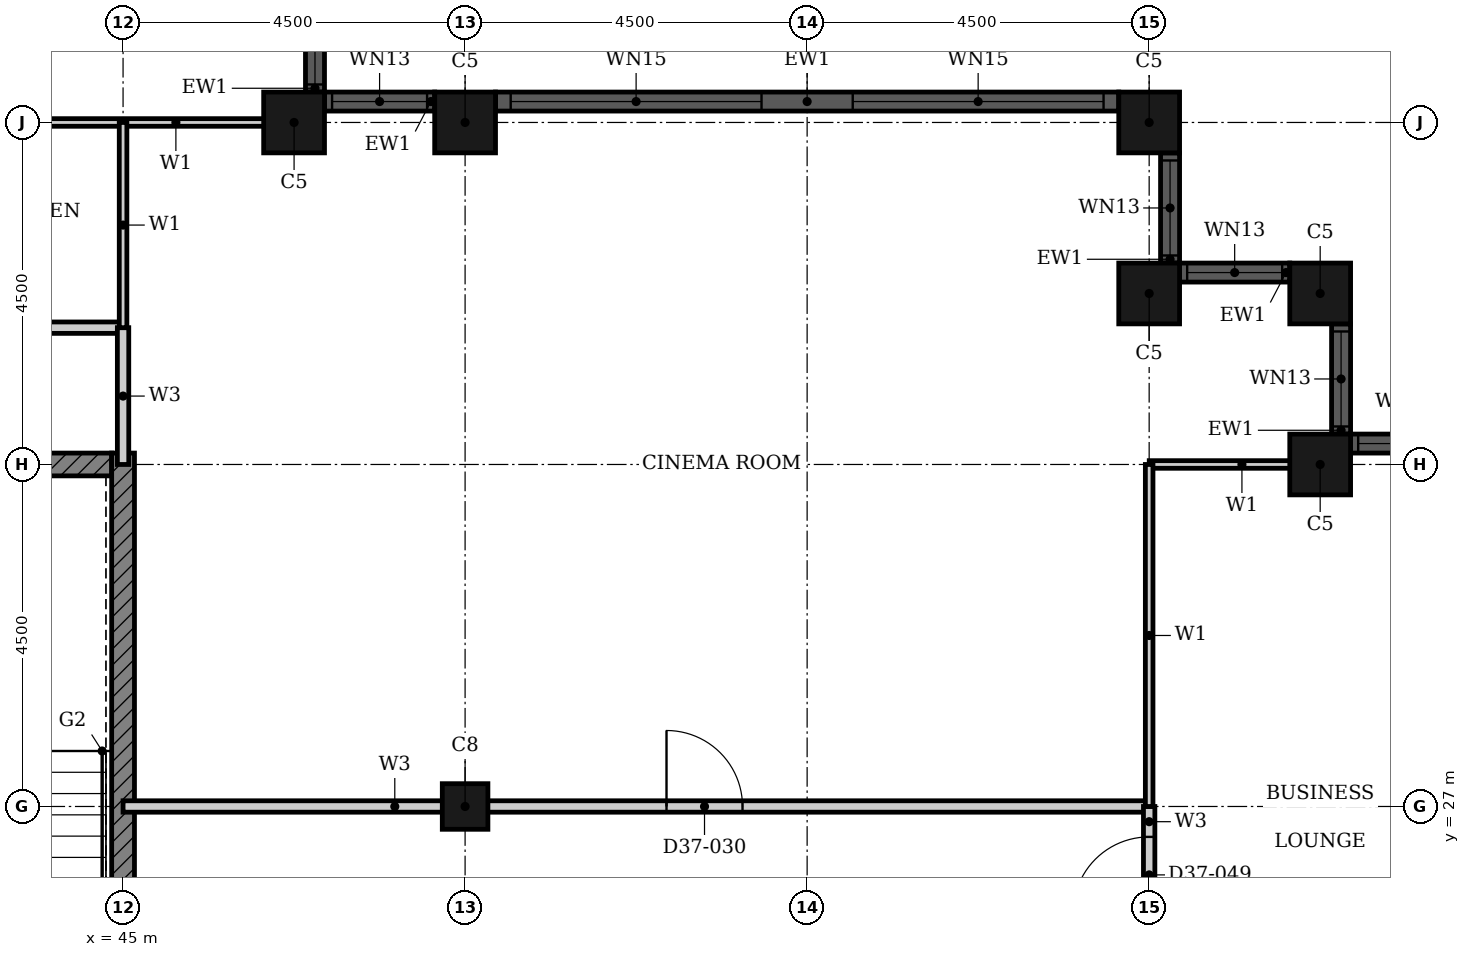
"""IFC4 building model, lengths in metres.
Left out: names, types, materials, properties, quantities, classifications, styles, units other than length and angle.
Written with IfcOpenShell. Run it as: python <this file> out.ifc"""

import sys

from ifc_helpers import new_model, si_unit, direction, frame, frame_2d, origin, origin_2d, place, context, subcontext, project, spatial, rectangle, hollow_rectangle, extrude, element, fill, save


model = new_model("IFC4")
c1 = context("Model", 3, precision=1e-05, world=origin(), true_north=direction((0.0, 1.0)))
c2 = subcontext(c1, "Body", "Model", "MODEL_VIEW")
j1 = project(units=[si_unit("LENGTHUNIT", "METRE"), si_unit("PLANEANGLEUNIT", "RADIAN")], contexts=[c1])
p1 = place(None, origin())
s1 = spatial("IfcSite", under=j1, at=p1, CompositionType="ELEMENT")
p2 = place(p1, origin())
s2 = spatial("IfcBuilding", under=s1, at=p2, CompositionType="ELEMENT")
p3 = place(p2, frame((0.0, 0.0, 150.6)))
s3 = spatial("IfcBuildingStorey", under=s2, at=p3, CompositionType="ELEMENT", Elevation=150.6)
for number, where, z_axis, x_axis in (
    (1, (60.75, 31.5, 0.0), (0.0, 0.0, 1.0), (1.0, 0.0, 0.0)),
    (2, (60.75, 33.75, 0.0), (0.0, 0.0, 1.0), (1.0, 0.0, 0.0)),
    (3, (58.5, 33.75, 0.0), (0.0, 0.0, 1.0), (1.0, 0.0, 0.0)),
    (4, (58.5, 36.0, 0.0), (0.0, 0.0, 1.0), (1.0, 0.0, 0.0)),
    (5, (49.5, 36.0, 0.0), (0.0, 0.0, 1.0), (1.0, 0.0, 0.0)),
    (6, (47.25, 36.0, 0.0), (0.0, 0.0, 1.0), (1.0, 0.0, 0.0)),
):
    element("IfcColumn", number, at=place(p3, frame(where, z_axis=z_axis, x_axis=x_axis)), inside=s3, PredefinedType="COLUMN", context=c2, shape_type="SweptSolid", body=[
        extrude(hollow_rectangle(XDim=0.8, YDim=0.8, WallThickness=0.025, at=origin_2d()), origin(), (0.0, 0.0, 1.0), 3.7),
    ])
p4 = place(p3, frame((49.5, 27.0, 0.0), z_axis=(0.0, 0.0, 1.0), x_axis=(1.0, 0.0, 0.0)))
e7 = element("IfcColumn", 7, at=p4, inside=s3, PredefinedType="COLUMN", context=c2, shape_type="SweptSolid", body=[
    extrude(hollow_rectangle(XDim=0.6, YDim=0.6, WallThickness=0.02, at=origin_2d()), origin(), (0.0, 0.0, 1.0), 3.7),
])
p5 = place(p3, frame((62.6, 31.775, 0.0), z_axis=(0.0, 0.0, 1.0), x_axis=(-1.0, 0.0, 0.0)))
e8 = element("IfcWall", 8, at=p5, inside=s3, PredefinedType="SOLIDWALL", context=c2, shape_type="SweptSolid", body=[
    extrude(rectangle(XDim=1.45, YDim=0.25, at=frame_2d((0.725, 0.0))), origin(), (0.0, 0.0, 1.0), 3.7),
])
p6 = place(p5, frame((0.1, 0.0, 0.9)))
e9 = element("IfcOpeningElement", 9, at=p6, cuts=e8, PredefinedType="OPENING", context=c2, shape_type="SweptSolid", body=[
    extrude(rectangle(XDim=1.25, YDim=1.85, at=frame_2d((0.625, 0.925))), frame((0.0, 0.135, 0.0), z_axis=(0.0, -1.0, 0.0), x_axis=(1.0, 0.0, 0.0)), (0.0, 0.0, 1.0), 0.27),
])
p7 = place(p3, frame((61.025, 31.9, 0.0), z_axis=(0.0, 0.0, 1.0), x_axis=(0.0, 1.0, 0.0)))
e10 = element("IfcWall", 10, at=p7, inside=s3, PredefinedType="SOLIDWALL", context=c2, shape_type="SweptSolid", body=[
    extrude(rectangle(XDim=1.45, YDim=0.25, at=frame_2d((0.725, 0.0))), origin(), (0.0, 0.0, 1.0), 3.7),
])
p8 = place(p7, frame((0.1, 0.0, 0.9)))
e11 = element("IfcOpeningElement", 11, at=p8, cuts=e10, PredefinedType="OPENING", context=c2, shape_type="SweptSolid", body=[
    extrude(rectangle(XDim=1.25, YDim=1.85, at=frame_2d((0.625, 0.925))), frame((0.0, 0.135, 0.0), z_axis=(0.0, -1.0, 0.0), x_axis=(1.0, 0.0, 0.0)), (0.0, 0.0, 1.0), 0.27),
])
p9 = place(p3, frame((60.35, 34.025, 0.0), z_axis=(0.0, 0.0, 1.0), x_axis=(-1.0, 0.0, 0.0)))
e12 = element("IfcWall", 12, at=p9, inside=s3, PredefinedType="SOLIDWALL", context=c2, shape_type="SweptSolid", body=[
    extrude(rectangle(XDim=1.45, YDim=0.25, at=frame_2d((0.725, 0.0))), origin(), (0.0, 0.0, 1.0), 3.7),
])
p10 = place(p9, frame((0.1, 0.0, 0.9)))
e13 = element("IfcOpeningElement", 13, at=p10, cuts=e12, PredefinedType="OPENING", context=c2, shape_type="SweptSolid", body=[
    extrude(rectangle(XDim=1.25, YDim=1.85, at=frame_2d((0.625, 0.925))), frame((0.0, 0.135, 0.0), z_axis=(0.0, -1.0, 0.0), x_axis=(1.0, 0.0, 0.0)), (0.0, 0.0, 1.0), 0.27),
])
p11 = place(p3, frame((58.775, 34.15, 0.0), z_axis=(0.0, 0.0, 1.0), x_axis=(0.0, 1.0, 0.0)))
e14 = element("IfcWall", 14, at=p11, inside=s3, PredefinedType="SOLIDWALL", context=c2, shape_type="SweptSolid", body=[
    extrude(rectangle(XDim=1.45, YDim=0.25, at=frame_2d((0.725, 0.0))), origin(), (0.0, 0.0, 1.0), 3.7),
])
p12 = place(p11, frame((0.1, 0.0, 0.9)))
e15 = element("IfcOpeningElement", 15, at=p12, cuts=e14, PredefinedType="OPENING", context=c2, shape_type="SweptSolid", body=[
    extrude(rectangle(XDim=1.25, YDim=1.85, at=frame_2d((0.625, 0.925))), frame((0.0, 0.135, 0.0), z_axis=(0.0, -1.0, 0.0), x_axis=(1.0, 0.0, 0.0)), (0.0, 0.0, 1.0), 0.27),
])
p13 = place(p3, frame((58.1, 36.275, 0.0), z_axis=(0.0, 0.0, 1.0), x_axis=(-1.0, 0.0, 0.0)))
e16 = element("IfcWall", 16, at=p13, inside=s3, PredefinedType="SOLIDWALL", context=c2, shape_type="SweptSolid", body=[
    extrude(rectangle(XDim=8.2, YDim=0.25, at=frame_2d((4.1, 0.0))), origin(), (0.0, 0.0, 1.0), 3.7),
])
p14 = place(p13, frame((0.2, 0.0, 0.45)))
e17 = element("IfcOpeningElement", 17, at=p14, cuts=e16, PredefinedType="OPENING", context=c2, shape_type="SweptSolid", body=[
    extrude(rectangle(XDim=3.3, YDim=2.3, at=frame_2d((1.65, 1.15))), frame((0.0, 0.135, 0.0), z_axis=(0.0, -1.0, 0.0), x_axis=(1.0, 0.0, 0.0)), (0.0, 0.0, 1.0), 0.27),
])
p15 = place(p13, frame((4.7, 0.0, 0.45)))
e18 = element("IfcOpeningElement", 18, at=p15, cuts=e16, PredefinedType="OPENING", context=c2, shape_type="SweptSolid", body=[
    extrude(rectangle(XDim=3.3, YDim=2.3, at=frame_2d((1.65, 1.15))), frame((0.0, 0.135, 0.0), z_axis=(0.0, -1.0, 0.0), x_axis=(1.0, 0.0, 0.0)), (0.0, 0.0, 1.0), 0.27),
])
p16 = place(p3, frame((49.1, 36.275, 0.0), z_axis=(0.0, 0.0, 1.0), x_axis=(-1.0, 0.0, 0.0)))
e19 = element("IfcWall", 19, at=p16, inside=s3, PredefinedType="SOLIDWALL", context=c2, shape_type="SweptSolid", body=[
    extrude(rectangle(XDim=1.45, YDim=0.25, at=frame_2d((0.725, 0.0))), origin(), (0.0, 0.0, 1.0), 3.7),
])
p17 = place(p16, frame((0.1, 0.0, 0.9)))
e20 = element("IfcOpeningElement", 20, at=p17, cuts=e19, PredefinedType="OPENING", context=c2, shape_type="SweptSolid", body=[
    extrude(rectangle(XDim=1.25, YDim=1.85, at=frame_2d((0.625, 0.925))), frame((0.0, 0.135, 0.0), z_axis=(0.0, -1.0, 0.0), x_axis=(1.0, 0.0, 0.0)), (0.0, 0.0, 1.0), 0.27),
])
p18 = place(p3, frame((47.525, 36.4, 0.0), z_axis=(0.0, 0.0, 1.0), x_axis=(0.0, 1.0, 0.0)))
e21 = element("IfcWall", 21, at=p18, inside=s3, PredefinedType="SOLIDWALL", context=c2, shape_type="SweptSolid", body=[
    extrude(rectangle(XDim=1.45, YDim=0.25, at=frame_2d((0.725, 0.0))), origin(), (0.0, 0.0, 1.0), 3.7),
])
p19 = place(p18, frame((0.1, 0.0, 0.9)))
e22 = element("IfcOpeningElement", 22, at=p19, cuts=e21, PredefinedType="OPENING", context=c2, shape_type="SweptSolid", body=[
    extrude(rectangle(XDim=1.25, YDim=1.85, at=frame_2d((0.625, 0.925))), frame((0.0, 0.135, 0.0), z_axis=(0.0, -1.0, 0.0), x_axis=(1.0, 0.0, 0.0)), (0.0, 0.0, 1.0), 0.27),
])
p20 = place(p3, frame((40.625, 31.5, 0.0), z_axis=(0.0, 0.0, 1.0), x_axis=(1.0, 0.0, 0.0)))
e23 = element("IfcWall", 23, at=p20, inside=s3, PredefinedType="SHEAR", context=c2, shape_type="SweptSolid", body=[
    extrude(rectangle(XDim=4.225, YDim=0.3, at=frame_2d((2.113, 0.0))), origin(), (0.0, 0.0, 1.0), 3.4),
])
p21 = place(p3, frame((45.0, 22.35, 0.0), z_axis=(0.0, 0.0, 1.0), x_axis=(0.0, 1.0, 0.0)))
e24 = element("IfcWall", 24, at=p21, inside=s3, PredefinedType="SHEAR", context=c2, shape_type="SweptSolid", body=[
    extrude(rectangle(XDim=9.3, YDim=0.3, at=frame_2d((4.65, 0.0))), origin(), (0.0, 0.0, 1.0), 3.4),
])
p22 = place(p3, frame((45.0, 27.0, 0.0), z_axis=(0.0, 0.0, 1.0), x_axis=(1.0, 0.0, 0.0)))
e25 = element("IfcWall", 25, at=p22, inside=s3, PredefinedType="PARTITIONING", context=c2, shape_type="SweptSolid", body=[
    extrude(rectangle(XDim=13.5, YDim=0.15, at=frame_2d((6.75, 0.0))), origin(), (0.0, 0.0, 1.0), 2.68),
])
p23 = place(p22, frame((7.15, 0.0, 0.0)))
e26 = element("IfcOpeningElement", 26, at=p23, cuts=e25, PredefinedType="OPENING", context=c2, shape_type="SweptSolid", body=[
    extrude(rectangle(XDim=1.0, YDim=2.1, at=frame_2d((0.5, 1.05))), frame((0.0, 0.085, 0.0), z_axis=(0.0, -1.0, 0.0), x_axis=(1.0, 0.0, 0.0)), (0.0, 0.0, 1.0), 0.17),
])
p24 = place(p3, frame((38.4, 33.3, 0.0), z_axis=(0.0, 0.0, 1.0), x_axis=(1.0, 0.0, 0.0)))
e27 = element("IfcWall", 27, at=p24, inside=s3, PredefinedType="PARTITIONING", context=c2, shape_type="SweptSolid", body=[
    extrude(rectangle(XDim=6.6, YDim=0.15, at=frame_2d((3.3, 0.0))), origin(), (0.0, 0.0, 1.0), 3.4),
])
p25 = place(p24, frame((1.3, 0.0, 0.0)))
e28 = element("IfcOpeningElement", 28, at=p25, cuts=e27, PredefinedType="OPENING", context=c2, shape_type="SweptSolid", body=[
    extrude(rectangle(XDim=1.0, YDim=2.2, at=frame_2d((0.5, 1.1))), frame((0.0, 0.085, 0.0), z_axis=(0.0, -1.0, 0.0), x_axis=(1.0, 0.0, 0.0)), (0.0, 0.0, 1.0), 0.17),
])
p26 = place(p3, frame((45.0, 31.5, 0.0), z_axis=(0.0, 0.0, 1.0), x_axis=(0.0, 1.0, 0.0)))
e29 = element("IfcWall", 29, at=p26, inside=s3, PredefinedType="PARTITIONING", context=c2, shape_type="SweptSolid", body=[
    extrude(rectangle(XDim=1.8, YDim=0.15, at=frame_2d((0.9, 0.0))), origin(), (0.0, 0.0, 1.0), 3.4),
])
p27 = place(p3, frame((58.5, 25.2, 0.0), z_axis=(0.0, 0.0, 1.0), x_axis=(0.0, 1.0, 0.0)))
e30 = element("IfcWall", 30, at=p27, inside=s3, PredefinedType="PARTITIONING", context=c2, shape_type="SweptSolid", body=[
    extrude(rectangle(XDim=1.8, YDim=0.15, at=frame_2d((0.9, 0.0))), origin(), (0.0, 0.0, 1.0), 3.4),
])
p28 = place(p27, frame((0.4, 0.0, 0.0)))
e31 = element("IfcOpeningElement", 31, at=p28, cuts=e30, PredefinedType="OPENING", context=c2, shape_type="SweptSolid", body=[
    extrude(rectangle(XDim=1.0, YDim=2.1, at=frame_2d((0.5, 1.05))), frame((0.0, 0.085, 0.0), z_axis=(0.0, -1.0, 0.0), x_axis=(1.0, 0.0, 0.0)), (0.0, 0.0, 1.0), 0.17),
])
p29 = place(p3, frame((58.501, 31.5, 0.0), z_axis=(0.0, 0.0, 1.0), x_axis=(1.0, 0.0, 0.0)))
e32 = element("IfcWall", 32, at=p29, inside=s3, PredefinedType="PARTITIONING", context=c2, shape_type="SweptSolid", body=[
    extrude(rectangle(XDim=2.439, YDim=0.1, at=frame_2d((1.219, 0.0))), origin(), (0.0, 0.0, 1.0), 2.68),
])
p30 = place(p3, frame((42.0, 36.0, 0.0), z_axis=(0.0, 0.0, 1.0), x_axis=(1.0, 0.0, 0.0)))
e33 = element("IfcWall", 33, at=p30, inside=s3, PredefinedType="PARTITIONING", context=c2, shape_type="SweptSolid", body=[
    extrude(rectangle(XDim=5.44, YDim=0.1, at=frame_2d((2.72, 0.0))), origin(), (0.0, 0.0, 1.0), 3.4),
])
p31 = place(p30, frame((1.05, 0.0, 0.0)))
e34 = element("IfcOpeningElement", 34, at=p31, cuts=e33, PredefinedType="OPENING", context=c2, shape_type="SweptSolid", body=[
    extrude(rectangle(XDim=0.9, YDim=2.1, at=frame_2d((0.45, 1.05))), frame((0.0, 0.06, 0.0), z_axis=(0.0, -1.0, 0.0), x_axis=(1.0, 0.0, 0.0)), (0.0, 0.0, 1.0), 0.12),
])
p32 = place(p3, frame((45.0, 33.3, 0.0), z_axis=(0.0, 0.0, 1.0), x_axis=(0.0, 1.0, 0.0)))
e35 = element("IfcWall", 35, at=p32, inside=s3, PredefinedType="PARTITIONING", context=c2, shape_type="SweptSolid", body=[
    extrude(rectangle(XDim=2.7, YDim=0.1, at=frame_2d((1.35, 0.0))), origin(), (0.0, 0.0, 1.0), 3.4),
])
p33 = place(p3, frame((58.5, 27.0, 0.0), z_axis=(0.0, 0.0, 1.0), x_axis=(0.0, 1.0, 0.0)))
e36 = element("IfcWall", 36, at=p33, inside=s3, PredefinedType="PARTITIONING", context=c2, shape_type="SweptSolid", body=[
    extrude(rectangle(XDim=4.5, YDim=0.1, at=frame_2d((2.25, 0.0))), origin(), (0.0, 0.0, 1.0), 3.4),
])
p34 = place(p6, origin())
e37 = element("IfcWindow", 37, at=p34, inside=s3, PartitioningType="SINGLE_PANEL", PredefinedType="WINDOW", context=c2, shape_type="SweptSolid", body=[
    extrude(rectangle(XDim=1.25, YDim=1.85, at=frame_2d((0.625, 0.925))), frame((0.0, 0.03, 0.0), z_axis=(0.0, -1.0, 0.0), x_axis=(1.0, 0.0, 0.0)), (0.0, 0.0, 1.0), 0.06),
])
fill(e9, e37)
p35 = place(p8, origin())
e38 = element("IfcWindow", 38, at=p35, inside=s3, PartitioningType="SINGLE_PANEL", PredefinedType="WINDOW", context=c2, shape_type="SweptSolid", body=[
    extrude(rectangle(XDim=1.25, YDim=1.85, at=frame_2d((0.625, 0.925))), frame((0.0, 0.03, 0.0), z_axis=(0.0, -1.0, 0.0), x_axis=(1.0, 0.0, 0.0)), (0.0, 0.0, 1.0), 0.06),
])
fill(e11, e38)
p36 = place(p10, origin())
e39 = element("IfcWindow", 39, at=p36, inside=s3, PartitioningType="SINGLE_PANEL", PredefinedType="WINDOW", context=c2, shape_type="SweptSolid", body=[
    extrude(rectangle(XDim=1.25, YDim=1.85, at=frame_2d((0.625, 0.925))), frame((0.0, 0.03, 0.0), z_axis=(0.0, -1.0, 0.0), x_axis=(1.0, 0.0, 0.0)), (0.0, 0.0, 1.0), 0.06),
])
fill(e13, e39)
p37 = place(p12, origin())
e40 = element("IfcWindow", 40, at=p37, inside=s3, PartitioningType="SINGLE_PANEL", PredefinedType="WINDOW", context=c2, shape_type="SweptSolid", body=[
    extrude(rectangle(XDim=1.25, YDim=1.85, at=frame_2d((0.625, 0.925))), frame((0.0, 0.03, 0.0), z_axis=(0.0, -1.0, 0.0), x_axis=(1.0, 0.0, 0.0)), (0.0, 0.0, 1.0), 0.06),
])
fill(e15, e40)
p38 = place(p14, origin())
e41 = element("IfcWindow", 41, at=p38, inside=s3, PartitioningType="SINGLE_PANEL", PredefinedType="WINDOW", context=c2, shape_type="SweptSolid", body=[
    extrude(rectangle(XDim=3.3, YDim=2.3, at=frame_2d((1.65, 1.15))), frame((0.0, 0.03, 0.0), z_axis=(0.0, -1.0, 0.0), x_axis=(1.0, 0.0, 0.0)), (0.0, 0.0, 1.0), 0.06),
])
fill(e17, e41)
p39 = place(p15, origin())
e42 = element("IfcWindow", 42, at=p39, inside=s3, PartitioningType="SINGLE_PANEL", PredefinedType="WINDOW", context=c2, shape_type="SweptSolid", body=[
    extrude(rectangle(XDim=3.3, YDim=2.3, at=frame_2d((1.65, 1.15))), frame((0.0, 0.03, 0.0), z_axis=(0.0, -1.0, 0.0), x_axis=(1.0, 0.0, 0.0)), (0.0, 0.0, 1.0), 0.06),
])
fill(e18, e42)
p40 = place(p17, origin())
e43 = element("IfcWindow", 43, at=p40, inside=s3, PartitioningType="SINGLE_PANEL", PredefinedType="WINDOW", context=c2, shape_type="SweptSolid", body=[
    extrude(rectangle(XDim=1.25, YDim=1.85, at=frame_2d((0.625, 0.925))), frame((0.0, 0.03, 0.0), z_axis=(0.0, -1.0, 0.0), x_axis=(1.0, 0.0, 0.0)), (0.0, 0.0, 1.0), 0.06),
])
fill(e20, e43)
p41 = place(p19, origin())
e44 = element("IfcWindow", 44, at=p41, inside=s3, PartitioningType="SINGLE_PANEL", PredefinedType="WINDOW", context=c2, shape_type="SweptSolid", body=[
    extrude(rectangle(XDim=1.25, YDim=1.85, at=frame_2d((0.625, 0.925))), frame((0.0, 0.03, 0.0), z_axis=(0.0, -1.0, 0.0), x_axis=(1.0, 0.0, 0.0)), (0.0, 0.0, 1.0), 0.06),
])
fill(e22, e44)
p42 = place(p23, origin())
e45 = element("IfcDoor", 45, at=p42, inside=s3, OperationType="SINGLE_SWING_RIGHT", PredefinedType="DOOR", context=c2, shape_type="SweptSolid", body=[
    extrude(rectangle(XDim=1.0, YDim=2.1, at=frame_2d((0.5, 1.05))), frame((0.0, 0.025, 0.0), z_axis=(0.0, -1.0, 0.0), x_axis=(1.0, 0.0, 0.0)), (0.0, 0.0, 1.0), 0.05),
])
fill(e26, e45)
p43 = place(p28, origin())
e46 = element("IfcDoor", 46, at=p43, inside=s3, OperationType="SINGLE_SWING_LEFT", PredefinedType="DOOR", context=c2, shape_type="SweptSolid", body=[
    extrude(rectangle(XDim=1.0, YDim=2.1, at=frame_2d((0.5, 1.05))), frame((0.0, 0.025, 0.0), z_axis=(0.0, -1.0, 0.0), x_axis=(1.0, 0.0, 0.0)), (0.0, 0.0, 1.0), 0.05),
])
fill(e31, e46)
save(model, sys.argv[1])
